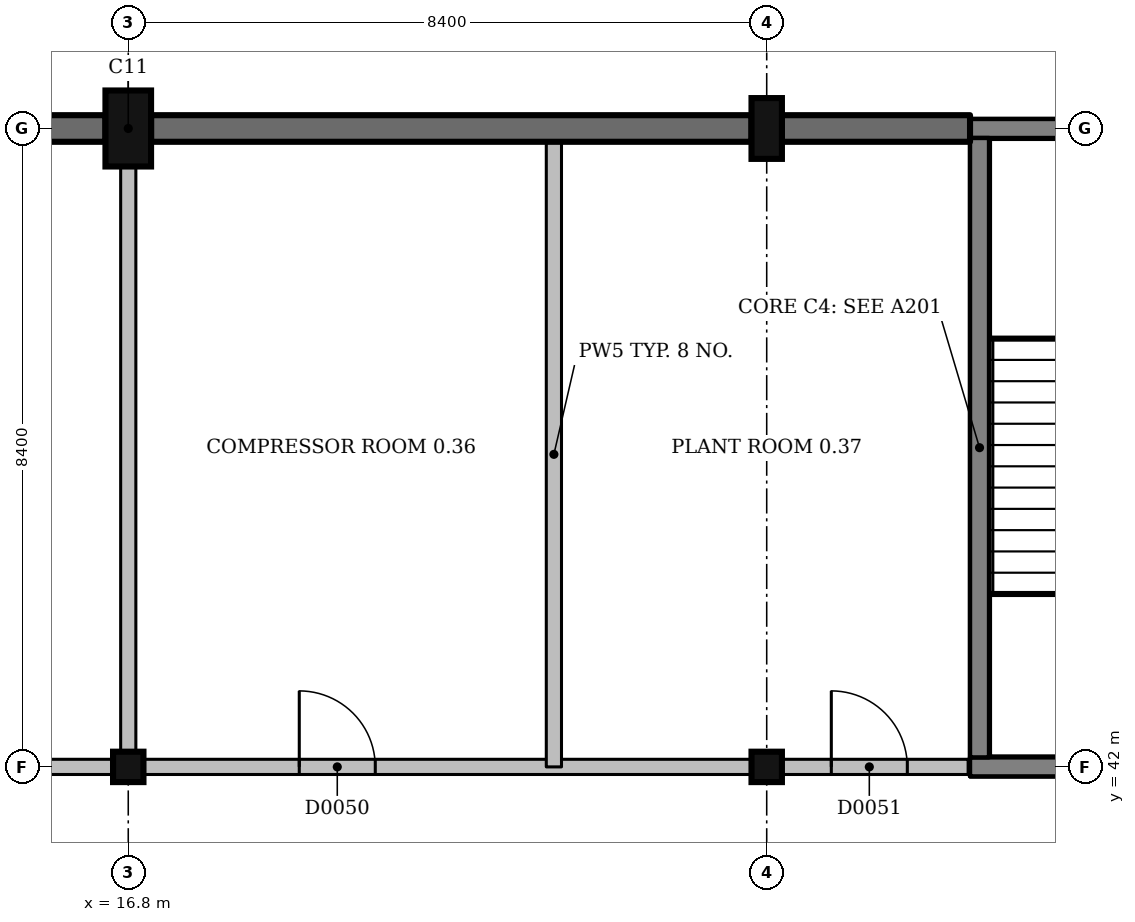
"""IFC4 building model, lengths in metres.
Left out: names, types, materials, properties, quantities, classifications, styles, units other than length and angle.
Written with IfcOpenShell. Run it as: python <this file> out.ifc"""

import sys

from ifc_helpers import new_model, si_unit, direction, frame, frame_2d, origin, origin_2d, place, context, subcontext, project, spatial, rectangle, extrude, element, fill, save


model = new_model("IFC4")
c1 = context("Model", 3, precision=1e-05, world=origin(), true_north=direction((0.0, 1.0)))
c2 = subcontext(c1, "Body", "Model", "MODEL_VIEW")
j1 = project(units=[si_unit("LENGTHUNIT", "METRE"), si_unit("PLANEANGLEUNIT", "RADIAN")], contexts=[c1])
p1 = place(None, origin())
s1 = spatial("IfcSite", under=j1, at=p1, CompositionType="ELEMENT")
p2 = place(p1, origin())
s2 = spatial("IfcBuilding", under=s1, at=p2, CompositionType="ELEMENT")
p3 = place(p2, origin())
s3 = spatial("IfcBuildingStorey", under=s2, at=p3, CompositionType="ELEMENT", Elevation=0.0)
p4 = place(p3, frame((16.8, 42.0, -1.5), z_axis=(0.0, 0.0, 1.0), x_axis=(1.0, 0.0, 0.0)))
e1 = element("IfcColumn", 1, at=p4, inside=s3, PredefinedType="COLUMN", context=c2, shape_type="SweptSolid", body=[
    extrude(rectangle(XDim=0.4, YDim=0.4, at=origin_2d()), origin(), (0.0, 0.0, 1.0), 6.0),
])
p5 = place(p3, frame((16.8, 50.4, -0.35), z_axis=(0.0, 0.0, 1.0), x_axis=(1.0, 0.0, 0.0)))
e2 = element("IfcColumn", 2, at=p5, inside=s3, PredefinedType="COLUMN", context=c2, shape_type="SweptSolid", body=[
    extrude(rectangle(XDim=0.6, YDim=1.0, at=origin_2d()), origin(), (0.0, 0.0, 1.0), 4.85),
])
p6 = place(p3, frame((25.2, 42.0, -1.5), z_axis=(0.0, 0.0, 1.0), x_axis=(1.0, 0.0, 0.0)))
e3 = element("IfcColumn", 3, at=p6, inside=s3, PredefinedType="COLUMN", context=c2, shape_type="SweptSolid", body=[
    extrude(rectangle(XDim=0.4, YDim=0.4, at=origin_2d()), origin(), (0.0, 0.0, 1.0), 6.0),
])
p7 = place(p3, frame((25.2, 50.4, -0.35), z_axis=(0.0, 0.0, 1.0), x_axis=(1.0, 0.0, 0.0)))
e4 = element("IfcColumn", 4, at=p7, inside=s3, PredefinedType="COLUMN", context=c2, shape_type="SweptSolid", body=[
    extrude(rectangle(XDim=0.4, YDim=0.8, at=origin_2d()), origin(), (0.0, 0.0, 1.0), 4.85),
])
p8 = place(p3, frame((27.875, 42.0, 0.0), z_axis=(0.0, 0.0, 1.0), x_axis=(1.0, 0.0, 0.0)))
e5 = element("IfcWall", 5, at=p8, inside=s3, PredefinedType="SHEAR", context=c2, shape_type="SweptSolid", body=[
    extrude(rectangle(XDim=5.525, YDim=0.25, at=frame_2d((2.762, 0.0))), origin(), (0.0, 0.0, 1.0), 4.5),
])
p9 = place(p8, frame((2.45, 0.0, 0.0)))
e6 = element("IfcOpeningElement", 6, at=p9, cuts=e5, PredefinedType="OPENING", context=c2, shape_type="SweptSolid", body=[
    extrude(rectangle(XDim=1.0, YDim=2.1, at=frame_2d((0.5, 1.05))), frame((0.0, 0.135, 0.0), z_axis=(0.0, -1.0, 0.0), x_axis=(1.0, 0.0, 0.0)), (0.0, 0.0, 1.0), 0.27),
])
p10 = place(p3, frame((27.875, 50.4, 0.0), z_axis=(0.0, 0.0, 1.0), x_axis=(1.0, 0.0, 0.0)))
e7 = element("IfcWall", 7, at=p10, inside=s3, PredefinedType="SHEAR", context=c2, shape_type="SweptSolid", body=[
    extrude(rectangle(XDim=5.425, YDim=0.25, at=frame_2d((2.712, 0.0))), origin(), (0.0, 0.0, 1.0), 4.5),
])
p11 = place(p3, frame((28.0, 42.125, 0.0), z_axis=(0.0, 0.0, 1.0), x_axis=(0.0, 1.0, 0.0)))
e8 = element("IfcWall", 8, at=p11, inside=s3, PredefinedType="SHEAR", context=c2, shape_type="SweptSolid", body=[
    extrude(rectangle(XDim=8.15, YDim=0.25, at=frame_2d((4.075, 0.0))), origin(), (0.0, 0.0, 1.0), 4.5),
])
for number, where, z_axis, x_axis in (
    (9, (27.875, 42.0, -1.5), (0.0, 0.0, 1.0), (1.0, 0.0, 0.0)),
    (10, (27.875, 50.4, -1.5), (0.0, 0.0, 1.0), (1.0, 0.0, 0.0)),
):
    element("IfcWall", number, at=place(p3, frame(where, z_axis=z_axis, x_axis=x_axis)), inside=s3, PredefinedType="SHEAR", context=c2, shape_type="SweptSolid", body=[
        extrude(rectangle(XDim=5.85, YDim=0.25, at=frame_2d((2.925, 0.0))), origin(), (0.0, 0.0, 1.0), 1.5),
    ])
p12 = place(p3, frame((28.0, 42.125, -1.5), z_axis=(0.0, 0.0, 1.0), x_axis=(0.0, 1.0, 0.0)))
e11 = element("IfcWall", 11, at=p12, inside=s3, PredefinedType="SHEAR", context=c2, shape_type="SweptSolid", body=[
    extrude(rectangle(XDim=8.15, YDim=0.25, at=frame_2d((4.075, 0.0))), origin(), (0.0, 0.0, 1.0), 1.5),
])
p13 = place(p3, frame((25.0, 50.4, -0.35), z_axis=(0.0, 0.0, 1.0), x_axis=(-1.0, 0.0, 0.0)))
e12 = element("IfcWall", 12, at=p13, inside=s3, PredefinedType="SOLIDWALL", context=c2, shape_type="SweptSolid", body=[
    extrude(rectangle(XDim=7.9, YDim=0.35, at=frame_2d((3.95, 0.0))), origin(), (0.0, 0.0, 1.0), 3.8),
])
p14 = place(p3, frame((17.0, 42.0, 0.0), z_axis=(0.0, 0.0, 1.0), x_axis=(1.0, 0.0, 0.0)))
e13 = element("IfcWall", 13, at=p14, inside=s3, PredefinedType="PARTITIONING", context=c2, shape_type="SweptSolid", body=[
    extrude(rectangle(XDim=8.0, YDim=0.2, at=frame_2d((4.0, 0.0))), origin(), (0.0, 0.0, 1.0), 3.45),
])
p15 = place(p14, frame((2.05, 0.0, 0.0)))
e14 = element("IfcOpeningElement", 14, at=p15, cuts=e13, PredefinedType="OPENING", context=c2, shape_type="SweptSolid", body=[
    extrude(rectangle(XDim=1.0, YDim=2.1, at=frame_2d((0.5, 1.05))), frame((0.0, 0.11, 0.0), z_axis=(0.0, -1.0, 0.0), x_axis=(1.0, 0.0, 0.0)), (0.0, 0.0, 1.0), 0.22),
])
p16 = place(p3, frame((25.4, 42.0, 0.0), z_axis=(0.0, 0.0, 1.0), x_axis=(1.0, 0.0, 0.0)))
e15 = element("IfcWall", 15, at=p16, inside=s3, PredefinedType="PARTITIONING", context=c2, shape_type="SweptSolid", body=[
    extrude(rectangle(XDim=2.45, YDim=0.2, at=frame_2d((1.225, 0.0))), origin(), (0.0, 0.0, 1.0), 3.45),
])
p17 = place(p16, frame((0.65, 0.0, 0.0)))
e16 = element("IfcOpeningElement", 16, at=p17, cuts=e15, PredefinedType="OPENING", context=c2, shape_type="SweptSolid", body=[
    extrude(rectangle(XDim=1.0, YDim=2.1, at=frame_2d((0.5, 1.05))), frame((0.0, 0.11, 0.0), z_axis=(0.0, -1.0, 0.0), x_axis=(1.0, 0.0, 0.0)), (0.0, 0.0, 1.0), 0.22),
])
p18 = place(p3, frame((8.6, 42.0, 0.0), z_axis=(0.0, 0.0, 1.0), x_axis=(1.0, 0.0, 0.0)))
e17 = element("IfcWall", 17, at=p18, inside=s3, PredefinedType="PARTITIONING", context=c2, shape_type="SweptSolid", body=[
    extrude(rectangle(XDim=8.0, YDim=0.2, at=frame_2d((4.0, 0.0))), origin(), (0.0, 0.0, 1.0), 3.45),
])
p19 = place(p18, frame((3.45, 0.0, 0.0)))
e18 = element("IfcOpeningElement", 18, at=p19, cuts=e17, PredefinedType="OPENING", context=c2, shape_type="SweptSolid", body=[
    extrude(rectangle(XDim=0.9, YDim=2.1, at=frame_2d((0.45, 1.05))), frame((0.0, 0.11, 0.0), z_axis=(0.0, -1.0, 0.0), x_axis=(1.0, 0.0, 0.0)), (0.0, 0.0, 1.0), 0.22),
])
p20 = place(p3, frame((16.8, 42.2, 0.0), z_axis=(0.0, 0.0, 1.0), x_axis=(0.0, 1.0, 0.0)))
e19 = element("IfcWall", 19, at=p20, inside=s3, PredefinedType="PARTITIONING", context=c2, shape_type="SweptSolid", body=[
    extrude(rectangle(XDim=7.7, YDim=0.2, at=frame_2d((3.85, 0.0))), origin(), (0.0, 0.0, 1.0), 3.5),
])
p21 = place(p3, frame((22.4, 42.0, 0.0), z_axis=(0.0, 0.0, 1.0), x_axis=(0.0, 1.0, 0.0)))
e20 = element("IfcWall", 20, at=p21, inside=s3, PredefinedType="PARTITIONING", context=c2, shape_type="SweptSolid", body=[
    extrude(rectangle(XDim=8.225, YDim=0.2, at=frame_2d((4.113, 0.0))), origin(), (0.0, 0.0, 1.0), 3.45),
])
p22 = place(p3, frame((27.875, 50.4, -0.35), z_axis=(0.0, 0.0, 1.0), x_axis=(-1.0, 0.0, 0.0)))
e21 = element("IfcWall", 21, at=p22, inside=s3, PredefinedType="SOLIDWALL", context=c2, shape_type="SweptSolid", body=[
    extrude(rectangle(XDim=2.475, YDim=0.35, at=frame_2d((1.238, 0.0))), origin(), (0.0, 0.0, 1.0), 3.8),
])
p23 = place(p3, frame((16.5, 50.4, -0.35), z_axis=(0.0, 0.0, 1.0), x_axis=(-1.0, 0.0, 0.0)))
e22 = element("IfcWall", 22, at=p23, inside=s3, PredefinedType="SOLIDWALL", context=c2, shape_type="SweptSolid", body=[
    extrude(rectangle(XDim=10.775, YDim=0.35, at=frame_2d((5.387, 0.0))), origin(), (0.0, 0.0, 1.0), 3.35),
])
p24 = place(p15, origin())
e23 = element("IfcDoor", 23, at=p24, inside=s3, OperationType="SINGLE_SWING_LEFT", PredefinedType="DOOR", context=c2, shape_type="SweptSolid", body=[
    extrude(rectangle(XDim=1.0, YDim=2.1, at=frame_2d((0.5, 1.05))), frame((0.0, 0.025, 0.0), z_axis=(0.0, -1.0, 0.0), x_axis=(1.0, 0.0, 0.0)), (0.0, 0.0, 1.0), 0.05),
])
fill(e14, e23)
p25 = place(p17, origin())
e24 = element("IfcDoor", 24, at=p25, inside=s3, OperationType="SINGLE_SWING_LEFT", PredefinedType="DOOR", context=c2, shape_type="SweptSolid", body=[
    extrude(rectangle(XDim=1.0, YDim=2.1, at=frame_2d((0.5, 1.05))), frame((0.0, 0.025, 0.0), z_axis=(0.0, -1.0, 0.0), x_axis=(1.0, 0.0, 0.0)), (0.0, 0.0, 1.0), 0.05),
])
fill(e16, e24)
save(model, sys.argv[1])
